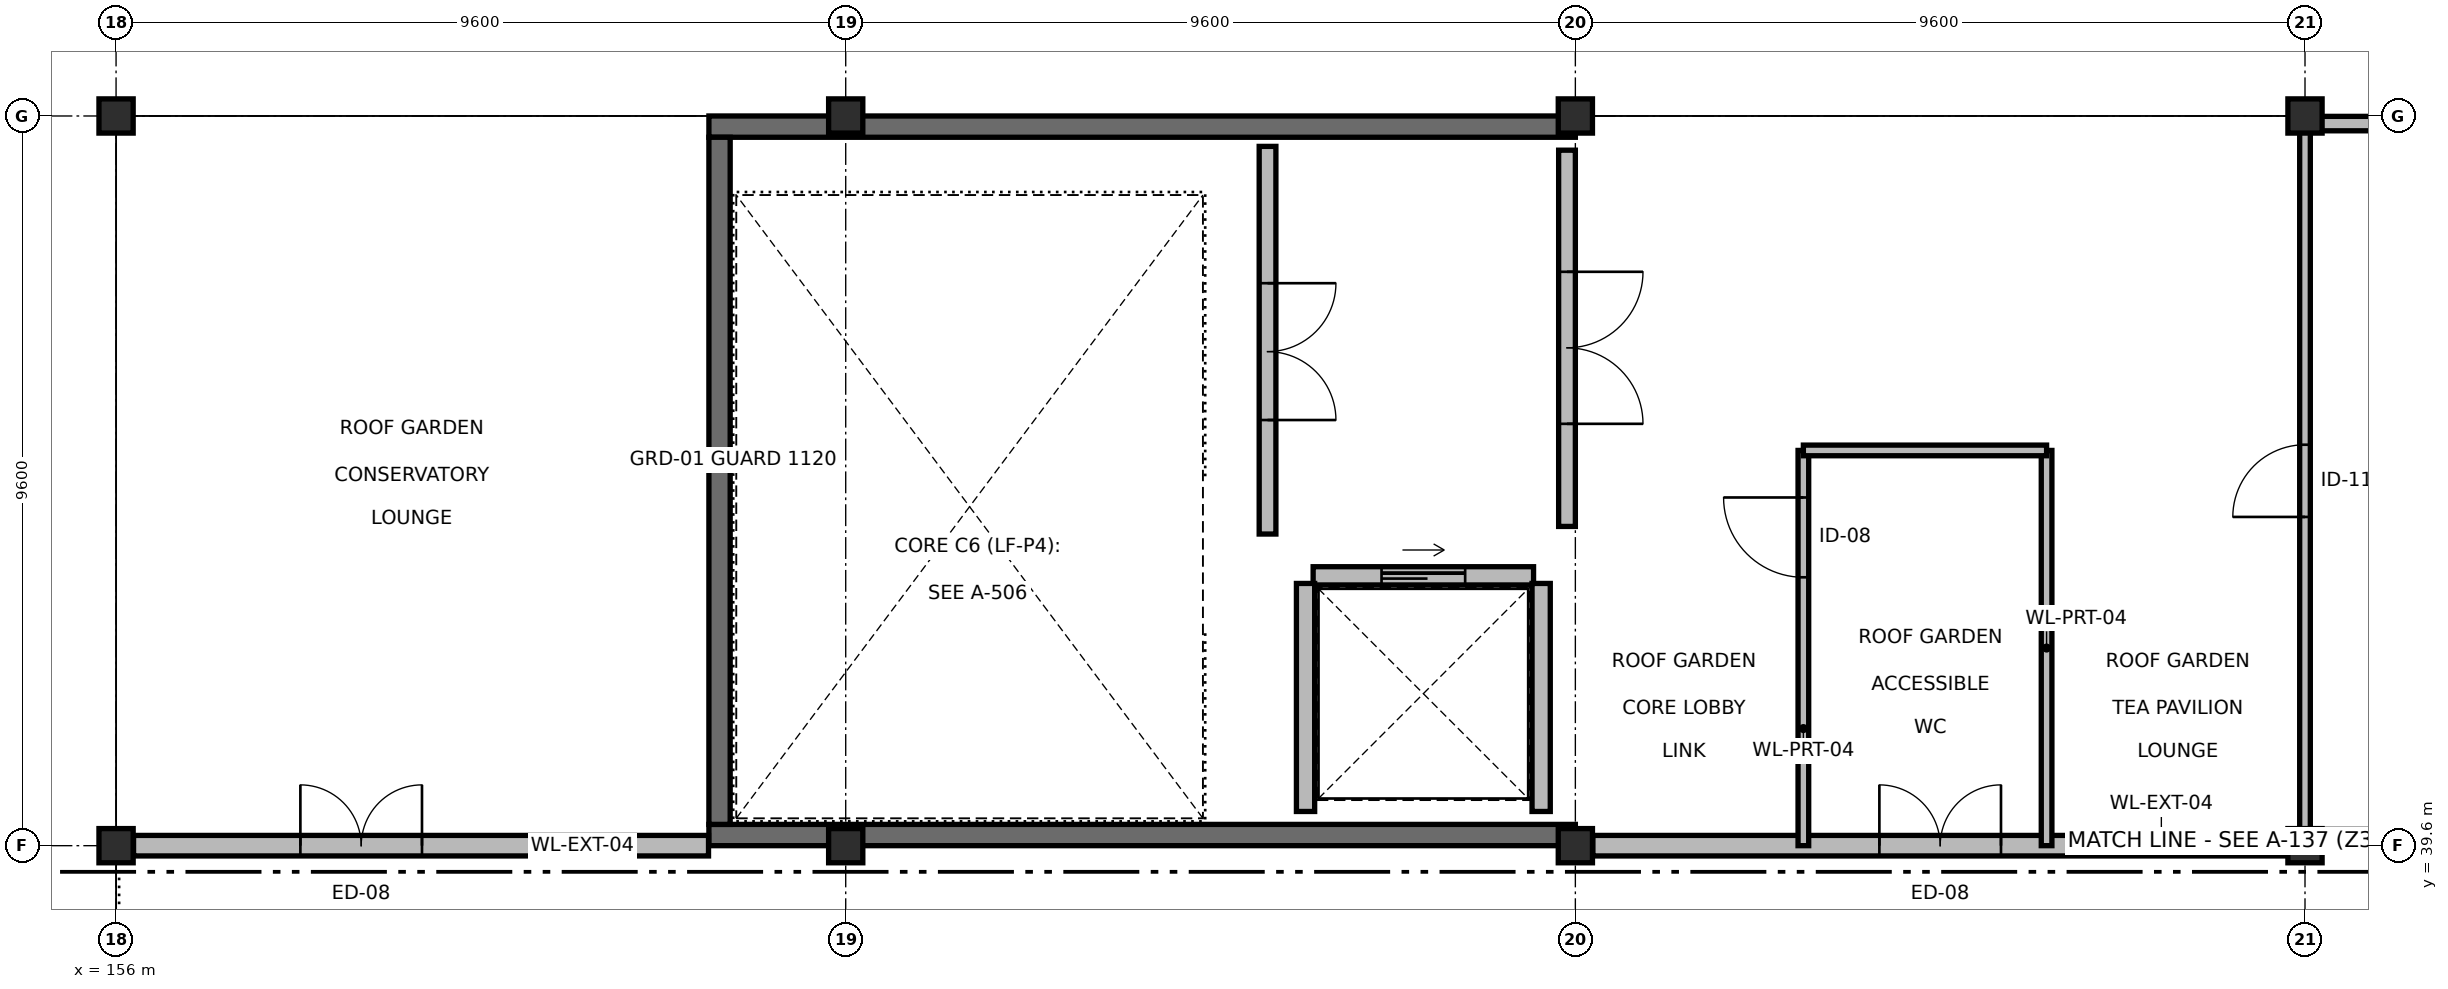
"""IFC4 building model, lengths in metres.
Left out: names, types, materials, properties, quantities, classifications, styles, units other than length and angle.
Written with IfcOpenShell. Run it as: python <this file> out.ifc"""

import sys

from ifc_helpers import new_model, si_unit, direction, frame, frame_2d, origin, origin_2d, place, context, subcontext, project, spatial, rectangle, extrude, element, fill, save


model = new_model("IFC4")
c1 = context("Model", 3, precision=1e-05, world=origin(), true_north=direction((0.0, 1.0)))
c2 = subcontext(c1, "Body", "Model", "MODEL_VIEW")
j1 = project(units=[si_unit("LENGTHUNIT", "METRE"), si_unit("PLANEANGLEUNIT", "RADIAN")], contexts=[c1])
p1 = place(None, origin())
s1 = spatial("IfcSite", under=j1, at=p1, CompositionType="ELEMENT")
p2 = place(p1, origin())
s2 = spatial("IfcBuilding", under=s1, at=p2, CompositionType="ELEMENT")
p3 = place(p2, frame((0.0, 0.0, 14.1)))
s3 = spatial("IfcBuildingStorey", under=s2, at=p3, CompositionType="ELEMENT", Elevation=14.1)
for number, where, z_axis, x_axis in (
    (1, (156.0, 39.6, 0.0), (0.0, 0.0, 1.0), (1.0, 0.0, 0.0)),
    (2, (156.0, 49.2, 0.0), (0.0, 0.0, 1.0), (1.0, 0.0, 0.0)),
    (3, (165.6, 39.6, 0.0), (0.0, 0.0, 1.0), (1.0, 0.0, 0.0)),
    (4, (165.6, 49.2, 0.0), (0.0, 0.0, 1.0), (1.0, 0.0, 0.0)),
    (5, (175.2, 39.6, 0.0), (0.0, 0.0, 1.0), (1.0, 0.0, 0.0)),
    (6, (175.2, 49.2, 0.0), (0.0, 0.0, 1.0), (1.0, 0.0, 0.0)),
    (7, (184.8, 39.6, 0.0), (0.0, 0.0, 1.0), (1.0, 0.0, 0.0)),
    (8, (184.8, 49.2, 0.0), (0.0, 0.0, 1.0), (1.0, 0.0, 0.0)),
):
    element("IfcColumn", number, at=place(p3, frame(where, z_axis=z_axis, x_axis=x_axis)), inside=s3, PredefinedType="COLUMN", context=c2, shape_type="SweptSolid", body=[
        extrude(rectangle(XDim=0.45, YDim=0.45, at=origin_2d()), origin(), (0.0, 0.0, 1.0), 4.5),
    ])
for number, where, z_axis, x_axis in (
    (9, (163.8, 39.74, 0.0), (0.0, 0.0, 1.0), (1.0, 0.0, 0.0)),
    (10, (163.8, 49.06, 0.0), (0.0, 0.0, 1.0), (1.0, 0.0, 0.0)),
):
    element("IfcWall", number, at=place(p3, frame(where, z_axis=z_axis, x_axis=x_axis)), inside=s3, PredefinedType="SHEAR", context=c2, shape_type="SweptSolid", body=[
        extrude(rectangle(XDim=11.4, YDim=0.28, at=frame_2d((5.7, 0.0))), origin(), (0.0, 0.0, 1.0), 4.5),
    ])
p4 = place(p3, frame((163.94, 39.88, 0.0), z_axis=(0.0, 0.0, 1.0), x_axis=(0.0, 1.0, 0.0)))
e11 = element("IfcWall", 11, at=p4, inside=s3, PredefinedType="SHEAR", context=c2, shape_type="SweptSolid", body=[
    extrude(rectangle(XDim=9.04, YDim=0.28, at=frame_2d((4.52, 0.0))), origin(), (0.0, 0.0, 1.0), 4.5),
])
p5 = place(p3, frame((163.795, 39.6, 0.0), z_axis=(0.0, 0.0, 1.0), x_axis=(-1.0, 0.0, 0.0)))
e12 = element("IfcWall", 12, at=p5, inside=s3, PredefinedType="SOLIDWALL", context=c2, shape_type="SweptSolid", body=[
    extrude(rectangle(XDim=7.565, YDim=0.27, at=frame_2d((3.782, 0.0))), origin(), (0.0, 0.0, 1.0), 3.55),
])
p6 = place(p5, frame((3.77, 0.0, 0.0)))
e13 = element("IfcOpeningElement", 13, at=p6, cuts=e12, PredefinedType="OPENING", context=c2, shape_type="SweptSolid", body=[
    extrude(rectangle(XDim=1.6, YDim=2.2, at=frame_2d((0.8, 1.1))), frame((0.0, 0.145, 0.0), z_axis=(0.0, -1.0, 0.0), x_axis=(1.0, 0.0, 0.0)), (0.0, 0.0, 1.0), 0.29),
])
p7 = place(p3, frame((184.57, 39.6, 0.0), z_axis=(0.0, 0.0, 1.0), x_axis=(-1.0, 0.0, 0.0)))
e14 = element("IfcWall", 14, at=p7, inside=s3, PredefinedType="SOLIDWALL", context=c2, shape_type="SweptSolid", body=[
    extrude(rectangle(XDim=9.14, YDim=0.27, at=frame_2d((4.57, 0.0))), origin(), (0.0, 0.0, 1.0), 3.55),
])
p8 = place(p7, frame((3.77, 0.0, 0.0)))
e15 = element("IfcOpeningElement", 15, at=p8, cuts=e14, PredefinedType="OPENING", context=c2, shape_type="SweptSolid", body=[
    extrude(rectangle(XDim=1.6, YDim=2.2, at=frame_2d((0.8, 1.1))), frame((0.0, 0.145, 0.0), z_axis=(0.0, -1.0, 0.0), x_axis=(1.0, 0.0, 0.0)), (0.0, 0.0, 1.0), 0.29),
])
for number, where, z_axis, x_axis in (
    (16, (184.9, 39.72, 0.0), (0.0, 0.0, 1.0), (1.0, 0.0, 0.0)),
    (17, (194.3, 49.1, 0.0), (0.0, 0.0, 1.0), (-1.0, 0.0, 0.0)),
):
    element("IfcWall", number, at=place(p3, frame(where, z_axis=z_axis, x_axis=x_axis)), inside=s3, PredefinedType="PARAPET", context=c2, shape_type="SweptSolid", body=[
        extrude(rectangle(XDim=9.4, YDim=0.19, at=frame_2d((4.7, 0.0))), origin(), (0.0, 0.0, 1.0), 1.12),
    ])
p9 = place(p3, frame((171.15, 43.7, 0.0), z_axis=(0.0, 0.0, 1.0), x_axis=(0.0, 1.0, 0.0)))
e18 = element("IfcWall", 18, at=p9, inside=s3, PredefinedType="PARTITIONING", context=c2, shape_type="SweptSolid", body=[
    extrude(rectangle(XDim=5.1, YDim=0.22, at=frame_2d((2.55, 0.0))), origin(), (0.0, 0.0, 1.0), 3.903),
])
p10 = place(p9, frame((1.5, 0.0, 0.0)))
e19 = element("IfcOpeningElement", 19, at=p10, cuts=e18, PredefinedType="OPENING", context=c2, shape_type="SweptSolid", body=[
    extrude(rectangle(XDim=1.8, YDim=2.2, at=frame_2d((0.9, 1.1))), frame((0.0, 0.12, 0.0), z_axis=(0.0, -1.0, 0.0), x_axis=(1.0, 0.0, 0.0)), (0.0, 0.0, 1.0), 0.24),
])
p11 = place(p3, frame((171.75, 43.15, 0.0), z_axis=(0.0, 0.0, 1.0), x_axis=(1.0, 0.0, 0.0)))
e20 = element("IfcWall", 20, at=p11, inside=s3, PredefinedType="SOLIDWALL", context=c2, shape_type="SweptSolid", body=[
    extrude(rectangle(XDim=2.9, YDim=0.24, at=frame_2d((1.45, 0.0))), origin(), (0.0, 0.0, 1.0), 4.205),
])
p12 = place(p11, frame((0.9, 0.0, 0.0)))
e21 = element("IfcOpeningElement", 21, at=p12, cuts=e20, PredefinedType="OPENING", context=c2, shape_type="SweptSolid", body=[
    extrude(rectangle(XDim=1.1, YDim=2.15, at=frame_2d((0.55, 1.075))), frame((0.0, 0.13, 0.0), z_axis=(0.0, -1.0, 0.0), x_axis=(1.0, 0.0, 0.0)), (0.0, 0.0, 1.0), 0.26),
])
for number, where, z_axis, x_axis in (
    (22, (171.65, 40.05, 0.0), (0.0, 0.0, 1.0), (0.0, 1.0, 0.0)),
    (23, (174.75, 40.05, 0.0), (0.0, 0.0, 1.0), (0.0, 1.0, 0.0)),
):
    element("IfcWall", number, at=place(p3, frame(where, z_axis=z_axis, x_axis=x_axis)), inside=s3, PredefinedType="SOLIDWALL", context=c2, shape_type="SweptSolid", body=[
        extrude(rectangle(XDim=3.0, YDim=0.24, at=frame_2d((1.5, 0.0))), origin(), (0.0, 0.0, 1.0), 4.205),
    ])
p13 = place(p3, frame((175.09, 43.8, 0.0), z_axis=(0.0, 0.0, 1.0), x_axis=(0.0, 1.0, 0.0)))
e24 = element("IfcWall", 24, at=p13, inside=s3, PredefinedType="PARTITIONING", context=c2, shape_type="SweptSolid", body=[
    extrude(rectangle(XDim=4.95, YDim=0.22, at=frame_2d((2.475, 0.0))), origin(), (0.0, 0.0, 1.0), 3.655),
])
p14 = place(p13, frame((1.35, 0.0, 0.0)))
e25 = element("IfcOpeningElement", 25, at=p14, cuts=e24, PredefinedType="OPENING", context=c2, shape_type="SweptSolid", body=[
    extrude(rectangle(XDim=2.0, YDim=2.2, at=frame_2d((1.0, 1.1))), frame((0.0, 0.12, 0.0), z_axis=(0.0, -1.0, 0.0), x_axis=(1.0, 0.0, 0.0)), (0.0, 0.0, 1.0), 0.24),
])
p15 = place(p3, frame((178.2, 39.6, 0.0), z_axis=(0.0, 0.0, 1.0), x_axis=(0.0, 1.0, 0.0)))
e26 = element("IfcWall", 26, at=p15, inside=s3, PredefinedType="PARTITIONING", context=c2, shape_type="SweptSolid", body=[
    extrude(rectangle(XDim=5.2, YDim=0.14, at=frame_2d((2.6, 0.0))), origin(), (0.0, 0.0, 1.0), 3.555),
])
p16 = place(p15, frame((3.531, 0.0, 0.0)))
e27 = element("IfcOpeningElement", 27, at=p16, cuts=e26, PredefinedType="OPENING", context=c2, shape_type="SweptSolid", body=[
    extrude(rectangle(XDim=1.05, YDim=2.2, at=frame_2d((0.525, 1.1))), frame((0.0, 0.08, 0.0), z_axis=(0.0, -1.0, 0.0), x_axis=(1.0, 0.0, 0.0)), (0.0, 0.0, 1.0), 0.16),
])
p17 = place(p3, frame((181.4, 39.6, 0.0), z_axis=(0.0, 0.0, 1.0), x_axis=(0.0, 1.0, 0.0)))
e28 = element("IfcWall", 28, at=p17, inside=s3, PredefinedType="PARTITIONING", context=c2, shape_type="SweptSolid", body=[
    extrude(rectangle(XDim=5.2, YDim=0.14, at=frame_2d((2.6, 0.0))), origin(), (0.0, 0.0, 1.0), 3.555),
])
p18 = place(p3, frame((178.2, 44.8, 0.0), z_axis=(0.0, 0.0, 1.0), x_axis=(1.0, 0.0, 0.0)))
e29 = element("IfcWall", 29, at=p18, inside=s3, PredefinedType="PARTITIONING", context=c2, shape_type="SweptSolid", body=[
    extrude(rectangle(XDim=3.2, YDim=0.14, at=frame_2d((1.6, 0.0))), origin(), (0.0, 0.0, 1.0), 4.205),
])
p19 = place(p3, frame((184.8, 39.6, 0.0), z_axis=(0.0, 0.0, 1.0), x_axis=(0.0, 1.0, 0.0)))
e30 = element("IfcWall", 30, at=p19, inside=s3, PredefinedType="PARTITIONING", context=c2, shape_type="SweptSolid", body=[
    extrude(rectangle(XDim=9.6, YDim=0.14, at=frame_2d((4.8, 0.0))), origin(), (0.0, 0.0, 1.0), 3.555),
])
p20 = place(p19, frame((4.325, 0.0, 0.0)))
e31 = element("IfcOpeningElement", 31, at=p20, cuts=e30, PredefinedType="OPENING", context=c2, shape_type="SweptSolid", body=[
    extrude(rectangle(XDim=0.95, YDim=2.1, at=frame_2d((0.475, 1.05))), frame((0.0, 0.08, 0.0), z_axis=(0.0, -1.0, 0.0), x_axis=(1.0, 0.0, 0.0)), (0.0, 0.0, 1.0), 0.16),
])
p21 = place(p6, origin())
e32 = element("IfcDoor", 32, at=p21, inside=s3, OperationType="DOUBLE_DOOR_SINGLE_SWING", PredefinedType="DOOR", context=c2, shape_type="SweptSolid", body=[
    extrude(rectangle(XDim=1.6, YDim=2.2, at=frame_2d((0.8, 1.1))), frame((0.0, 0.025, 0.0), z_axis=(0.0, -1.0, 0.0), x_axis=(1.0, 0.0, 0.0)), (0.0, 0.0, 1.0), 0.05),
])
fill(e13, e32)
p22 = place(p8, origin())
e33 = element("IfcDoor", 33, at=p22, inside=s3, OperationType="DOUBLE_DOOR_SINGLE_SWING", PredefinedType="DOOR", context=c2, shape_type="SweptSolid", body=[
    extrude(rectangle(XDim=1.6, YDim=2.2, at=frame_2d((0.8, 1.1))), frame((0.0, 0.025, 0.0), z_axis=(0.0, -1.0, 0.0), x_axis=(1.0, 0.0, 0.0)), (0.0, 0.0, 1.0), 0.05),
])
fill(e15, e33)
p23 = place(p10, origin())
e34 = element("IfcDoor", 34, at=p23, inside=s3, OperationType="DOUBLE_DOOR_SINGLE_SWING", PredefinedType="DOOR", context=c2, shape_type="SweptSolid", body=[
    extrude(rectangle(XDim=1.8, YDim=2.2, at=frame_2d((0.9, 1.1))), frame((0.0, 0.025, 0.0), z_axis=(0.0, -1.0, 0.0), x_axis=(1.0, 0.0, 0.0)), (0.0, 0.0, 1.0), 0.05),
])
fill(e19, e34)
p24 = place(p12, origin())
e35 = element("IfcDoor", 35, at=p24, inside=s3, OperationType="DOUBLE_DOOR_SLIDING", PredefinedType="DOOR", context=c2, shape_type="SweptSolid", body=[
    extrude(rectangle(XDim=1.1, YDim=2.15, at=frame_2d((0.55, 1.075))), frame((0.0, 0.025, 0.0), z_axis=(0.0, -1.0, 0.0), x_axis=(1.0, 0.0, 0.0)), (0.0, 0.0, 1.0), 0.05),
])
fill(e21, e35)
p25 = place(p14, origin())
e36 = element("IfcDoor", 36, at=p25, inside=s3, OperationType="DOUBLE_DOOR_SINGLE_SWING", PredefinedType="DOOR", context=c2, shape_type="SweptSolid", body=[
    extrude(rectangle(XDim=2.0, YDim=2.2, at=frame_2d((1.0, 1.1))), frame((0.0, 0.025, 0.0), z_axis=(0.0, -1.0, 0.0), x_axis=(1.0, 0.0, 0.0)), (0.0, 0.0, 1.0), 0.05),
])
fill(e25, e36)
p26 = place(p16, origin())
e37 = element("IfcDoor", 37, at=p26, inside=s3, OperationType="SINGLE_SWING_RIGHT", PredefinedType="DOOR", context=c2, shape_type="SweptSolid", body=[
    extrude(rectangle(XDim=1.05, YDim=2.2, at=frame_2d((0.525, 1.1))), frame((0.0, 0.025, 0.0), z_axis=(0.0, -1.0, 0.0), x_axis=(1.0, 0.0, 0.0)), (0.0, 0.0, 1.0), 0.05),
])
fill(e27, e37)
p27 = place(p20, origin())
e38 = element("IfcDoor", 38, at=p27, inside=s3, OperationType="SINGLE_SWING_LEFT", PredefinedType="DOOR", context=c2, shape_type="SweptSolid", body=[
    extrude(rectangle(XDim=0.95, YDim=2.1, at=frame_2d((0.475, 1.05))), frame((0.0, 0.025, 0.0), z_axis=(0.0, -1.0, 0.0), x_axis=(1.0, 0.0, 0.0)), (0.0, 0.0, 1.0), 0.05),
])
fill(e31, e38)
save(model, sys.argv[1])
